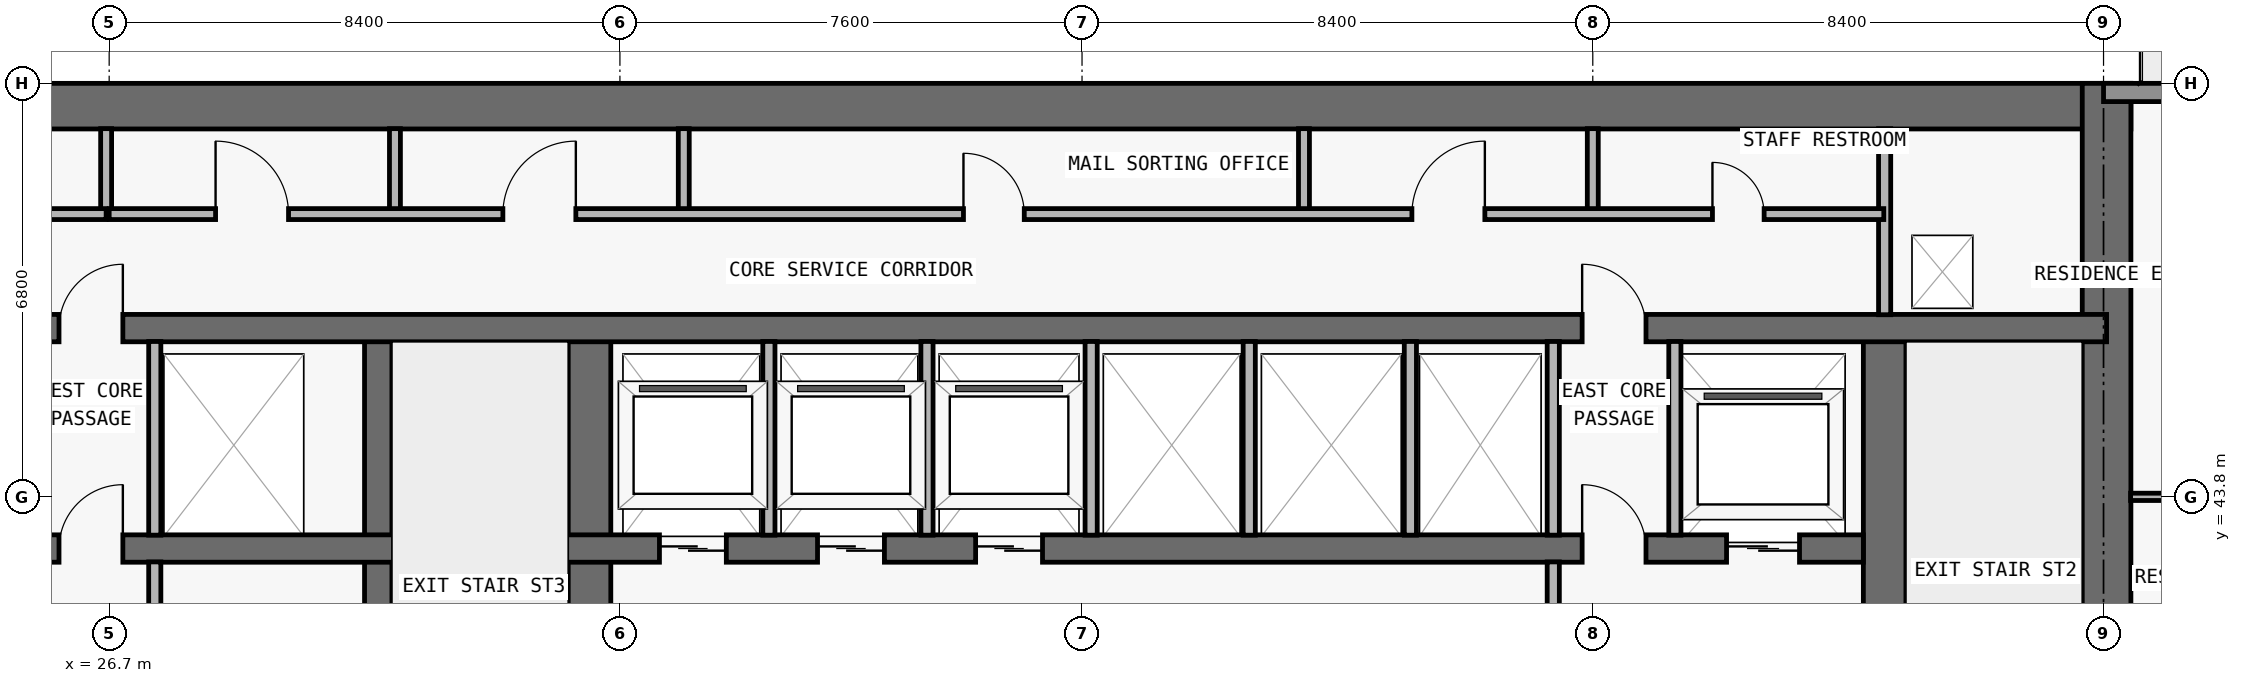
"""IFC4 building model, lengths in metres.
Left out: names, types, materials, properties, quantities, classifications, styles, units other than length and angle.
Written with IfcOpenShell. Run it as: python <this file> out.ifc"""

import sys

from ifc_helpers import new_model, si_unit, direction, frame, frame_2d, origin, place, context, subcontext, project, spatial, rectangle, extrude, element, fill, save


model = new_model("IFC4")
c1 = context("Model", 3, precision=1e-05, world=origin(), true_north=direction((0.0, 1.0)))
c2 = subcontext(c1, "Body", "Model", "MODEL_VIEW")
j1 = project(units=[si_unit("LENGTHUNIT", "METRE"), si_unit("PLANEANGLEUNIT", "RADIAN")], contexts=[c1])
p1 = place(None, origin())
s1 = spatial("IfcSite", under=j1, at=p1, CompositionType="ELEMENT")
p2 = place(p1, origin())
s2 = spatial("IfcBuilding", under=s1, at=p2, CompositionType="ELEMENT")
p3 = place(p2, frame((0.0, 0.0, 84.6)))
s3 = spatial("IfcBuildingStorey", under=s2, at=p3, CompositionType="ELEMENT", Elevation=84.6)
p4 = place(p3, frame((17.85, 50.225, 0.0), z_axis=(0.0, 0.0, 1.0), x_axis=(1.0, 0.0, 0.0)))
e1 = element("IfcWall", 1, at=p4, inside=s3, PredefinedType="SHEAR", context=c2, shape_type="SweptSolid", body=[
    extrude(rectangle(XDim=42.1, YDim=0.75, at=frame_2d((21.05, 0.0))), origin(), (0.0, 0.0, 1.0), 3.05),
])
p5 = place(p3, frame((59.55, 36.55, 0.0), z_axis=(0.0, 0.0, 1.0), x_axis=(0.0, 1.0, 0.0)))
e2 = element("IfcWall", 2, at=p5, inside=s3, PredefinedType="SHEAR", context=c2, shape_type="SweptSolid", body=[
    extrude(rectangle(XDim=14.05, YDim=0.8, at=frame_2d((7.025, 0.0))), origin(), (0.0, 0.0, 1.0), 3.05),
])
p6 = place(p3, frame((55.9, 36.95, 0.0), z_axis=(0.0, 0.0, 1.0), x_axis=(0.0, 1.0, 0.0)))
e3 = element("IfcWall", 3, at=p6, inside=s3, PredefinedType="SHEAR", context=c2, shape_type="SweptSolid", body=[
    extrude(rectangle(XDim=9.625, YDim=0.7, at=frame_2d((4.812, 0.0))), origin(), (0.0, 0.0, 1.0), 3.05),
])
p7 = place(p6, frame((0.6, 0.0, 0.0)))
e4 = element("IfcOpeningElement", 4, at=p7, cuts=e3, PredefinedType="OPENING", context=c2, shape_type="SweptSolid", body=[
    extrude(rectangle(XDim=1.1, YDim=2.15, at=frame_2d((0.55, 1.075))), frame((0.0, 0.36, 0.0), z_axis=(0.0, -1.0, 0.0), x_axis=(1.0, 0.0, 0.0)), (0.0, 0.0, 1.0), 0.72),
])
p8 = place(p3, frame((31.125, 36.95, 0.0), z_axis=(0.0, 0.0, 1.0), x_axis=(0.0, 1.0, 0.0)))
e5 = element("IfcWall", 5, at=p8, inside=s3, PredefinedType="SHEAR", context=c2, shape_type="SweptSolid", body=[
    extrude(rectangle(XDim=9.625, YDim=0.45, at=frame_2d((4.812, 0.0))), origin(), (0.0, 0.0, 1.0), 3.05),
])
p9 = place(p3, frame((34.6, 36.95, 0.0), z_axis=(0.0, 0.0, 1.0), x_axis=(0.0, 1.0, 0.0)))
e6 = element("IfcWall", 6, at=p9, inside=s3, PredefinedType="SHEAR", context=c2, shape_type="SweptSolid", body=[
    extrude(rectangle(XDim=9.625, YDim=0.7, at=frame_2d((4.812, 0.0))), origin(), (0.0, 0.0, 1.0), 3.05),
])
p10 = place(p3, frame((22.25, 42.95, 0.0), z_axis=(0.0, 0.0, 1.0), x_axis=(1.0, 0.0, 0.0)))
e7 = element("IfcWall", 7, at=p10, inside=s3, PredefinedType="SHEAR", context=c2, shape_type="SweptSolid", body=[
    extrude(rectangle(XDim=33.3, YDim=0.45, at=frame_2d((16.65, 0.0))), origin(), (0.0, 0.0, 1.0), 3.05),
])
p11 = place(p10, frame((1.05, 0.0, 0.0)))
e8 = element("IfcOpeningElement", 8, at=p11, cuts=e7, PredefinedType="OPENING", context=c2, shape_type="SweptSolid", body=[
    extrude(rectangle(XDim=1.2, YDim=2.2, at=frame_2d((0.6, 1.1))), frame((0.0, 0.235, 0.0), z_axis=(0.0, -1.0, 0.0), x_axis=(1.0, 0.0, 0.0)), (0.0, 0.0, 1.0), 0.47),
])
p12 = place(p10, frame((31.05, 0.0, 0.0)))
e9 = element("IfcOpeningElement", 9, at=p12, cuts=e7, PredefinedType="OPENING", context=c2, shape_type="SweptSolid", body=[
    extrude(rectangle(XDim=1.2, YDim=2.2, at=frame_2d((0.6, 1.1))), frame((0.0, 0.235, 0.0), z_axis=(0.0, -1.0, 0.0), x_axis=(1.0, 0.0, 0.0)), (0.0, 0.0, 1.0), 0.47),
])
p13 = place(p10, frame((13.5, 0.0, 0.0)))
e10 = element("IfcOpeningElement", 10, at=p13, cuts=e7, PredefinedType="OPENING", context=c2, shape_type="SweptSolid", body=[
    extrude(rectangle(XDim=1.1, YDim=2.2, at=frame_2d((0.55, 1.1))), frame((0.0, 0.235, 0.0), z_axis=(0.0, -1.0, 0.0), x_axis=(1.0, 0.0, 0.0)), (0.0, 0.0, 1.0), 0.47),
])
p14 = place(p10, frame((16.1, 0.0, 0.0)))
e11 = element("IfcOpeningElement", 11, at=p14, cuts=e7, PredefinedType="OPENING", context=c2, shape_type="SweptSolid", body=[
    extrude(rectangle(XDim=1.1, YDim=2.2, at=frame_2d((0.55, 1.1))), frame((0.0, 0.235, 0.0), z_axis=(0.0, -1.0, 0.0), x_axis=(1.0, 0.0, 0.0)), (0.0, 0.0, 1.0), 0.47),
])
p15 = place(p10, frame((18.7, 0.0, 0.0)))
e12 = element("IfcOpeningElement", 12, at=p15, cuts=e7, PredefinedType="OPENING", context=c2, shape_type="SweptSolid", body=[
    extrude(rectangle(XDim=1.1, YDim=2.2, at=frame_2d((0.55, 1.1))), frame((0.0, 0.235, 0.0), z_axis=(0.0, -1.0, 0.0), x_axis=(1.0, 0.0, 0.0)), (0.0, 0.0, 1.0), 0.47),
])
p16 = place(p10, frame((3.625, 0.0, 0.0)))
e13 = element("IfcOpeningElement", 13, at=p16, cuts=e7, PredefinedType="OPENING", context=c2, shape_type="SweptSolid", body=[
    extrude(rectangle(XDim=1.05, YDim=2.15, at=frame_2d((0.525, 1.075))), frame((0.0, 0.235, 0.0), z_axis=(0.0, -1.0, 0.0), x_axis=(1.0, 0.0, 0.0)), (0.0, 0.0, 1.0), 0.47),
])
p17 = place(p10, frame((28.675, 0.0, 0.0)))
e14 = element("IfcOpeningElement", 14, at=p17, cuts=e7, PredefinedType="OPENING", context=c2, shape_type="SweptSolid", body=[
    extrude(rectangle(XDim=1.05, YDim=2.15, at=frame_2d((0.525, 1.075))), frame((0.0, 0.235, 0.0), z_axis=(0.0, -1.0, 0.0), x_axis=(1.0, 0.0, 0.0)), (0.0, 0.0, 1.0), 0.47),
])
p18 = place(p3, frame((18.25, 46.575, 0.0), z_axis=(0.0, 0.0, 1.0), x_axis=(1.0, 0.0, 0.0)))
e15 = element("IfcWall", 15, at=p18, inside=s3, PredefinedType="SHEAR", context=c2, shape_type="SweptSolid", body=[
    extrude(rectangle(XDim=41.3, YDim=0.45, at=frame_2d((20.65, 0.0))), origin(), (0.0, 0.0, 1.0), 3.05),
])
p19 = place(p18, frame((7.625, 0.0, 0.0)))
e16 = element("IfcOpeningElement", 16, at=p19, cuts=e15, PredefinedType="OPENING", context=c2, shape_type="SweptSolid", body=[
    extrude(rectangle(XDim=1.05, YDim=2.15, at=frame_2d((0.525, 1.075))), frame((0.0, 0.235, 0.0), z_axis=(0.0, -1.0, 0.0), x_axis=(1.0, 0.0, 0.0)), (0.0, 0.0, 1.0), 0.47),
])
p20 = place(p18, frame((32.675, 0.0, 0.0)))
e17 = element("IfcOpeningElement", 17, at=p20, cuts=e15, PredefinedType="OPENING", context=c2, shape_type="SweptSolid", body=[
    extrude(rectangle(XDim=1.05, YDim=2.15, at=frame_2d((0.525, 1.075))), frame((0.0, 0.235, 0.0), z_axis=(0.0, -1.0, 0.0), x_axis=(1.0, 0.0, 0.0)), (0.0, 0.0, 1.0), 0.47),
])
p21 = place(p3, frame((59.5, 50.45, 0.0), z_axis=(0.0, 0.0, 1.0), x_axis=(1.0, 0.0, 0.0)))
e18 = element("IfcWall", 18, at=p21, inside=s3, PredefinedType="STANDARD", context=c2, shape_type="SweptSolid", body=[
    extrude(rectangle(XDim=10.6, YDim=0.3, at=frame_2d((5.3, 0.0))), origin(), (0.0, 0.0, 1.0), 3.05),
])
p22 = place(p21, frame((4.3, 0.0, 0.0)))
e19 = element("IfcOpeningElement", 19, at=p22, cuts=e18, PredefinedType="OPENING", context=c2, shape_type="SweptSolid", body=[
    extrude(rectangle(XDim=2.0, YDim=2.3, at=frame_2d((1.0, 1.15))), frame((0.0, 0.16, 0.0), z_axis=(0.0, -1.0, 0.0), x_axis=(1.0, 0.0, 0.0)), (0.0, 0.0, 1.0), 0.32),
])
p23 = place(p3, frame((26.65, 48.45, 0.0), z_axis=(0.0, 0.0, 1.0), x_axis=(0.0, 1.0, 0.0)))
e20 = element("IfcWall", 20, at=p23, inside=s3, PredefinedType="PARTITIONING", context=c2, shape_type="SweptSolid", body=[
    extrude(rectangle(XDim=1.405, YDim=0.18, at=frame_2d((0.703, 0.0))), origin(), (0.0, 0.0, 1.0), 3.05),
])
p24 = place(p3, frame((27.45, 37.345, 0.0), z_axis=(0.0, 0.0, 1.0), x_axis=(0.0, 1.0, 0.0)))
e21 = element("IfcWall", 21, at=p24, inside=s3, PredefinedType="PARTITIONING", context=c2, shape_type="SweptSolid", body=[
    extrude(rectangle(XDim=5.385, YDim=0.2, at=frame_2d((2.692, 0.0))), origin(), (0.0, 0.0, 1.0), 3.05),
])
p25 = place(p3, frame((27.45, 43.17, 0.0), z_axis=(0.0, 0.0, 1.0), x_axis=(0.0, 1.0, 0.0)))
e22 = element("IfcWall", 22, at=p25, inside=s3, PredefinedType="PARTITIONING", context=c2, shape_type="SweptSolid", body=[
    extrude(rectangle(XDim=3.185, YDim=0.2, at=frame_2d((1.593, 0.0))), origin(), (0.0, 0.0, 1.0), 3.05),
])
for number, where, z_axis, x_axis in (
    (23, (31.4, 48.45, 0.0), (0.0, 0.0, 1.0), (0.0, 1.0, 0.0)),
    (24, (36.15, 48.45, 0.0), (0.0, 0.0, 1.0), (0.0, 1.0, 0.0)),
):
    element("IfcWall", number, at=place(p3, frame(where, z_axis=z_axis, x_axis=x_axis)), inside=s3, PredefinedType="PARTITIONING", context=c2, shape_type="SweptSolid", body=[
        extrude(rectangle(XDim=1.405, YDim=0.18, at=frame_2d((0.703, 0.0))), origin(), (0.0, 0.0, 1.0), 3.05),
    ])
for number, where, z_axis, x_axis in (
    (25, (37.55, 43.17, 0.0), (0.0, 0.0, 1.0), (0.0, 1.0, 0.0)),
    (26, (40.15, 43.17, 0.0), (0.0, 0.0, 1.0), (0.0, 1.0, 0.0)),
    (27, (42.85, 43.17, 0.0), (0.0, 0.0, 1.0), (0.0, 1.0, 0.0)),
    (28, (45.45, 43.17, 0.0), (0.0, 0.0, 1.0), (0.0, 1.0, 0.0)),
):
    element("IfcWall", number, at=place(p3, frame(where, z_axis=z_axis, x_axis=x_axis)), inside=s3, PredefinedType="PARTITIONING", context=c2, shape_type="SweptSolid", body=[
        extrude(rectangle(XDim=3.185, YDim=0.2, at=frame_2d((1.593, 0.0))), origin(), (0.0, 0.0, 1.0), 3.05),
    ])
p26 = place(p3, frame((46.35, 48.45, 0.0), z_axis=(0.0, 0.0, 1.0), x_axis=(0.0, 1.0, 0.0)))
e29 = element("IfcWall", 29, at=p26, inside=s3, PredefinedType="PARTITIONING", context=c2, shape_type="SweptSolid", body=[
    extrude(rectangle(XDim=1.405, YDim=0.18, at=frame_2d((0.703, 0.0))), origin(), (0.0, 0.0, 1.0), 3.05),
])
p27 = place(p3, frame((48.1, 43.17, 0.0), z_axis=(0.0, 0.0, 1.0), x_axis=(0.0, 1.0, 0.0)))
e30 = element("IfcWall", 30, at=p27, inside=s3, PredefinedType="PARTITIONING", context=c2, shape_type="SweptSolid", body=[
    extrude(rectangle(XDim=3.185, YDim=0.2, at=frame_2d((1.593, 0.0))), origin(), (0.0, 0.0, 1.0), 3.05),
])
p28 = place(p3, frame((50.45, 37.345, 0.0), z_axis=(0.0, 0.0, 1.0), x_axis=(0.0, 1.0, 0.0)))
e31 = element("IfcWall", 31, at=p28, inside=s3, PredefinedType="PARTITIONING", context=c2, shape_type="SweptSolid", body=[
    extrude(rectangle(XDim=5.385, YDim=0.2, at=frame_2d((2.692, 0.0))), origin(), (0.0, 0.0, 1.0), 3.05),
])
p29 = place(p3, frame((50.45, 43.17, 0.0), z_axis=(0.0, 0.0, 1.0), x_axis=(0.0, 1.0, 0.0)))
e32 = element("IfcWall", 32, at=p29, inside=s3, PredefinedType="PARTITIONING", context=c2, shape_type="SweptSolid", body=[
    extrude(rectangle(XDim=3.185, YDim=0.2, at=frame_2d((1.593, 0.0))), origin(), (0.0, 0.0, 1.0), 3.05),
])
p30 = place(p3, frame((51.1, 48.45, 0.0), z_axis=(0.0, 0.0, 1.0), x_axis=(0.0, 1.0, 0.0)))
e33 = element("IfcWall", 33, at=p30, inside=s3, PredefinedType="PARTITIONING", context=c2, shape_type="SweptSolid", body=[
    extrude(rectangle(XDim=1.405, YDim=0.18, at=frame_2d((0.703, 0.0))), origin(), (0.0, 0.0, 1.0), 3.05),
])
p31 = place(p3, frame((52.45, 43.17, 0.0), z_axis=(0.0, 0.0, 1.0), x_axis=(0.0, 1.0, 0.0)))
e34 = element("IfcWall", 34, at=p31, inside=s3, PredefinedType="PARTITIONING", context=c2, shape_type="SweptSolid", body=[
    extrude(rectangle(XDim=3.185, YDim=0.2, at=frame_2d((1.593, 0.0))), origin(), (0.0, 0.0, 1.0), 3.05),
])
p32 = place(p3, frame((55.9, 46.795, 0.0), z_axis=(0.0, 0.0, 1.0), x_axis=(0.0, 1.0, 0.0)))
e35 = element("IfcWall", 35, at=p32, inside=s3, PredefinedType="PARTITIONING", context=c2, shape_type="SweptSolid", body=[
    extrude(rectangle(XDim=3.06, YDim=0.2, at=frame_2d((1.53, 0.0))), origin(), (0.0, 0.0, 1.0), 3.05),
])
p33 = place(p3, frame((59.945, 43.8, 0.0), z_axis=(0.0, 0.0, 1.0), x_axis=(1.0, 0.0, 0.0)))
e36 = element("IfcWall", 36, at=p33, inside=s3, PredefinedType="PARTITIONING", context=c2, shape_type="SweptSolid", body=[
    extrude(rectangle(XDim=13.66, YDim=0.12, at=frame_2d((6.83, 0.0))), origin(), (0.0, 0.0, 1.0), 2.339),
])
p34 = place(p33, frame((4.017, 0.0, 0.0)))
e37 = element("IfcOpeningElement", 37, at=p34, cuts=e36, PredefinedType="OPENING", context=c2, shape_type="SweptSolid", body=[
    extrude(rectangle(XDim=0.9, YDim=2.15, at=frame_2d((0.45, 1.075))), frame((0.0, 0.07, 0.0), z_axis=(0.0, -1.0, 0.0), x_axis=(1.0, 0.0, 0.0)), (0.0, 0.0, 1.0), 0.14),
])
p35 = place(p33, frame((0.702, 0.0, 0.0)))
e38 = element("IfcOpeningElement", 38, at=p35, cuts=e36, PredefinedType="OPENING", context=c2, shape_type="SweptSolid", body=[
    extrude(rectangle(XDim=0.85, YDim=2.1, at=frame_2d((0.425, 1.05))), frame((0.0, 0.07, 0.0), z_axis=(0.0, -1.0, 0.0), x_axis=(1.0, 0.0, 0.0)), (0.0, 0.0, 1.0), 0.14),
])
p36 = place(p3, frame((21.9, 48.45, 0.0), z_axis=(0.0, 0.0, 1.0), x_axis=(1.0, 0.0, 0.0)))
e39 = element("IfcWall", 39, at=p36, inside=s3, PredefinedType="PARTITIONING", context=c2, shape_type="SweptSolid", body=[
    extrude(rectangle(XDim=4.75, YDim=0.18, at=frame_2d((2.375, 0.0))), origin(), (0.0, 0.0, 1.0), 3.05),
])
p37 = place(p36, frame((1.775, 0.0, 0.0)))
e40 = element("IfcOpeningElement", 40, at=p37, cuts=e39, PredefinedType="OPENING", context=c2, shape_type="SweptSolid", body=[
    extrude(rectangle(XDim=1.2, YDim=2.2, at=frame_2d((0.6, 1.1))), frame((0.0, 0.1, 0.0), z_axis=(0.0, -1.0, 0.0), x_axis=(1.0, 0.0, 0.0)), (0.0, 0.0, 1.0), 0.2),
])
p38 = place(p3, frame((26.7, 48.45, 0.0), z_axis=(0.0, 0.0, 1.0), x_axis=(1.0, 0.0, 0.0)))
e41 = element("IfcWall", 41, at=p38, inside=s3, PredefinedType="PARTITIONING", context=c2, shape_type="SweptSolid", body=[
    extrude(rectangle(XDim=29.186, YDim=0.18, at=frame_2d((14.593, 0.0))), origin(), (0.0, 0.0, 1.0), 3.05),
])
p39 = place(p38, frame((1.75, 0.0, 0.0)))
e42 = element("IfcOpeningElement", 42, at=p39, cuts=e41, PredefinedType="OPENING", context=c2, shape_type="SweptSolid", body=[
    extrude(rectangle(XDim=1.2, YDim=2.2, at=frame_2d((0.6, 1.1))), frame((0.0, 0.1, 0.0), z_axis=(0.0, -1.0, 0.0), x_axis=(1.0, 0.0, 0.0)), (0.0, 0.0, 1.0), 0.2),
])
p40 = place(p38, frame((6.475, 0.0, 0.0)))
e43 = element("IfcOpeningElement", 43, at=p40, cuts=e41, PredefinedType="OPENING", context=c2, shape_type="SweptSolid", body=[
    extrude(rectangle(XDim=1.2, YDim=2.2, at=frame_2d((0.6, 1.1))), frame((0.0, 0.1, 0.0), z_axis=(0.0, -1.0, 0.0), x_axis=(1.0, 0.0, 0.0)), (0.0, 0.0, 1.0), 0.2),
])
p41 = place(p38, frame((14.05, 0.0, 0.0)))
e44 = element("IfcOpeningElement", 44, at=p41, cuts=e41, PredefinedType="OPENING", context=c2, shape_type="SweptSolid", body=[
    extrude(rectangle(XDim=1.0, YDim=2.2, at=frame_2d((0.5, 1.1))), frame((0.0, 0.1, 0.0), z_axis=(0.0, -1.0, 0.0), x_axis=(1.0, 0.0, 0.0)), (0.0, 0.0, 1.0), 0.2),
])
p42 = place(p38, frame((21.425, 0.0, 0.0)))
e45 = element("IfcOpeningElement", 45, at=p42, cuts=e41, PredefinedType="OPENING", context=c2, shape_type="SweptSolid", body=[
    extrude(rectangle(XDim=1.2, YDim=2.2, at=frame_2d((0.6, 1.1))), frame((0.0, 0.1, 0.0), z_axis=(0.0, -1.0, 0.0), x_axis=(1.0, 0.0, 0.0)), (0.0, 0.0, 1.0), 0.2),
])
p43 = place(p38, frame((26.368, 0.0, 0.0)))
e46 = element("IfcOpeningElement", 46, at=p43, cuts=e41, PredefinedType="OPENING", context=c2, shape_type="SweptSolid", body=[
    extrude(rectangle(XDim=0.85, YDim=2.1, at=frame_2d((0.425, 1.05))), frame((0.0, 0.1, 0.0), z_axis=(0.0, -1.0, 0.0), x_axis=(1.0, 0.0, 0.0)), (0.0, 0.0, 1.0), 0.2),
])
p44 = place(p12, origin())
e47 = element("IfcDoor", 47, at=p44, inside=s3, OperationType="DOUBLE_DOOR_SLIDING", PredefinedType="DOOR", context=c2, shape_type="SweptSolid", body=[
    extrude(rectangle(XDim=1.2, YDim=2.2, at=frame_2d((0.6, 1.1))), frame((0.0, 0.025, 0.0), z_axis=(0.0, -1.0, 0.0), x_axis=(1.0, 0.0, 0.0)), (0.0, 0.0, 1.0), 0.05),
])
fill(e9, e47)
p45 = place(p13, origin())
e48 = element("IfcDoor", 48, at=p45, inside=s3, OperationType="DOUBLE_DOOR_SLIDING", PredefinedType="DOOR", context=c2, shape_type="SweptSolid", body=[
    extrude(rectangle(XDim=1.1, YDim=2.2, at=frame_2d((0.55, 1.1))), frame((0.0, 0.025, 0.0), z_axis=(0.0, -1.0, 0.0), x_axis=(1.0, 0.0, 0.0)), (0.0, 0.0, 1.0), 0.05),
])
fill(e10, e48)
p46 = place(p14, origin())
e49 = element("IfcDoor", 49, at=p46, inside=s3, OperationType="DOUBLE_DOOR_SLIDING", PredefinedType="DOOR", context=c2, shape_type="SweptSolid", body=[
    extrude(rectangle(XDim=1.1, YDim=2.2, at=frame_2d((0.55, 1.1))), frame((0.0, 0.025, 0.0), z_axis=(0.0, -1.0, 0.0), x_axis=(1.0, 0.0, 0.0)), (0.0, 0.0, 1.0), 0.05),
])
fill(e11, e49)
p47 = place(p15, origin())
e50 = element("IfcDoor", 50, at=p47, inside=s3, OperationType="DOUBLE_DOOR_SLIDING", PredefinedType="DOOR", context=c2, shape_type="SweptSolid", body=[
    extrude(rectangle(XDim=1.1, YDim=2.2, at=frame_2d((0.55, 1.1))), frame((0.0, 0.025, 0.0), z_axis=(0.0, -1.0, 0.0), x_axis=(1.0, 0.0, 0.0)), (0.0, 0.0, 1.0), 0.05),
])
fill(e12, e50)
p48 = place(p16, origin())
e51 = element("IfcDoor", 51, at=p48, inside=s3, OperationType="SINGLE_SWING_RIGHT", PredefinedType="DOOR", context=c2, shape_type="SweptSolid", body=[
    extrude(rectangle(XDim=1.05, YDim=2.15, at=frame_2d((0.525, 1.075))), frame((0.0, 0.025, 0.0), z_axis=(0.0, -1.0, 0.0), x_axis=(1.0, 0.0, 0.0)), (0.0, 0.0, 1.0), 0.05),
])
fill(e13, e51)
p49 = place(p17, origin())
e52 = element("IfcDoor", 52, at=p49, inside=s3, OperationType="SINGLE_SWING_LEFT", PredefinedType="DOOR", context=c2, shape_type="SweptSolid", body=[
    extrude(rectangle(XDim=1.05, YDim=2.15, at=frame_2d((0.525, 1.075))), frame((0.0, 0.025, 0.0), z_axis=(0.0, -1.0, 0.0), x_axis=(1.0, 0.0, 0.0)), (0.0, 0.0, 1.0), 0.05),
])
fill(e14, e52)
p50 = place(p19, origin())
e53 = element("IfcDoor", 53, at=p50, inside=s3, OperationType="SINGLE_SWING_RIGHT", PredefinedType="DOOR", context=c2, shape_type="SweptSolid", body=[
    extrude(rectangle(XDim=1.05, YDim=2.15, at=frame_2d((0.525, 1.075))), frame((0.0, 0.025, 0.0), z_axis=(0.0, -1.0, 0.0), x_axis=(1.0, 0.0, 0.0)), (0.0, 0.0, 1.0), 0.05),
])
fill(e16, e53)
p51 = place(p20, origin())
e54 = element("IfcDoor", 54, at=p51, inside=s3, OperationType="SINGLE_SWING_LEFT", PredefinedType="DOOR", context=c2, shape_type="SweptSolid", body=[
    extrude(rectangle(XDim=1.05, YDim=2.15, at=frame_2d((0.525, 1.075))), frame((0.0, 0.025, 0.0), z_axis=(0.0, -1.0, 0.0), x_axis=(1.0, 0.0, 0.0)), (0.0, 0.0, 1.0), 0.05),
])
fill(e17, e54)
p52 = place(p39, origin())
e55 = element("IfcDoor", 55, at=p52, inside=s3, OperationType="SINGLE_SWING_LEFT", PredefinedType="DOOR", context=c2, shape_type="SweptSolid", body=[
    extrude(rectangle(XDim=1.2, YDim=2.2, at=frame_2d((0.6, 1.1))), frame((0.0, 0.025, 0.0), z_axis=(0.0, -1.0, 0.0), x_axis=(1.0, 0.0, 0.0)), (0.0, 0.0, 1.0), 0.05),
])
fill(e42, e55)
p53 = place(p40, origin())
e56 = element("IfcDoor", 56, at=p53, inside=s3, OperationType="SINGLE_SWING_RIGHT", PredefinedType="DOOR", context=c2, shape_type="SweptSolid", body=[
    extrude(rectangle(XDim=1.2, YDim=2.2, at=frame_2d((0.6, 1.1))), frame((0.0, 0.025, 0.0), z_axis=(0.0, -1.0, 0.0), x_axis=(1.0, 0.0, 0.0)), (0.0, 0.0, 1.0), 0.05),
])
fill(e43, e56)
p54 = place(p41, origin())
e57 = element("IfcDoor", 57, at=p54, inside=s3, OperationType="SINGLE_SWING_LEFT", PredefinedType="DOOR", context=c2, shape_type="SweptSolid", body=[
    extrude(rectangle(XDim=1.0, YDim=2.2, at=frame_2d((0.5, 1.1))), frame((0.0, 0.025, 0.0), z_axis=(0.0, -1.0, 0.0), x_axis=(1.0, 0.0, 0.0)), (0.0, 0.0, 1.0), 0.05),
])
fill(e44, e57)
p55 = place(p42, origin())
e58 = element("IfcDoor", 58, at=p55, inside=s3, OperationType="SINGLE_SWING_RIGHT", PredefinedType="DOOR", context=c2, shape_type="SweptSolid", body=[
    extrude(rectangle(XDim=1.2, YDim=2.2, at=frame_2d((0.6, 1.1))), frame((0.0, 0.025, 0.0), z_axis=(0.0, -1.0, 0.0), x_axis=(1.0, 0.0, 0.0)), (0.0, 0.0, 1.0), 0.05),
])
fill(e45, e58)
p56 = place(p43, origin())
e59 = element("IfcDoor", 59, at=p56, inside=s3, OperationType="SINGLE_SWING_LEFT", PredefinedType="DOOR", context=c2, shape_type="SweptSolid", body=[
    extrude(rectangle(XDim=0.85, YDim=2.1, at=frame_2d((0.425, 1.05))), frame((0.0, 0.025, 0.0), z_axis=(0.0, -1.0, 0.0), x_axis=(1.0, 0.0, 0.0)), (0.0, 0.0, 1.0), 0.05),
])
fill(e46, e59)
save(model, sys.argv[1])
